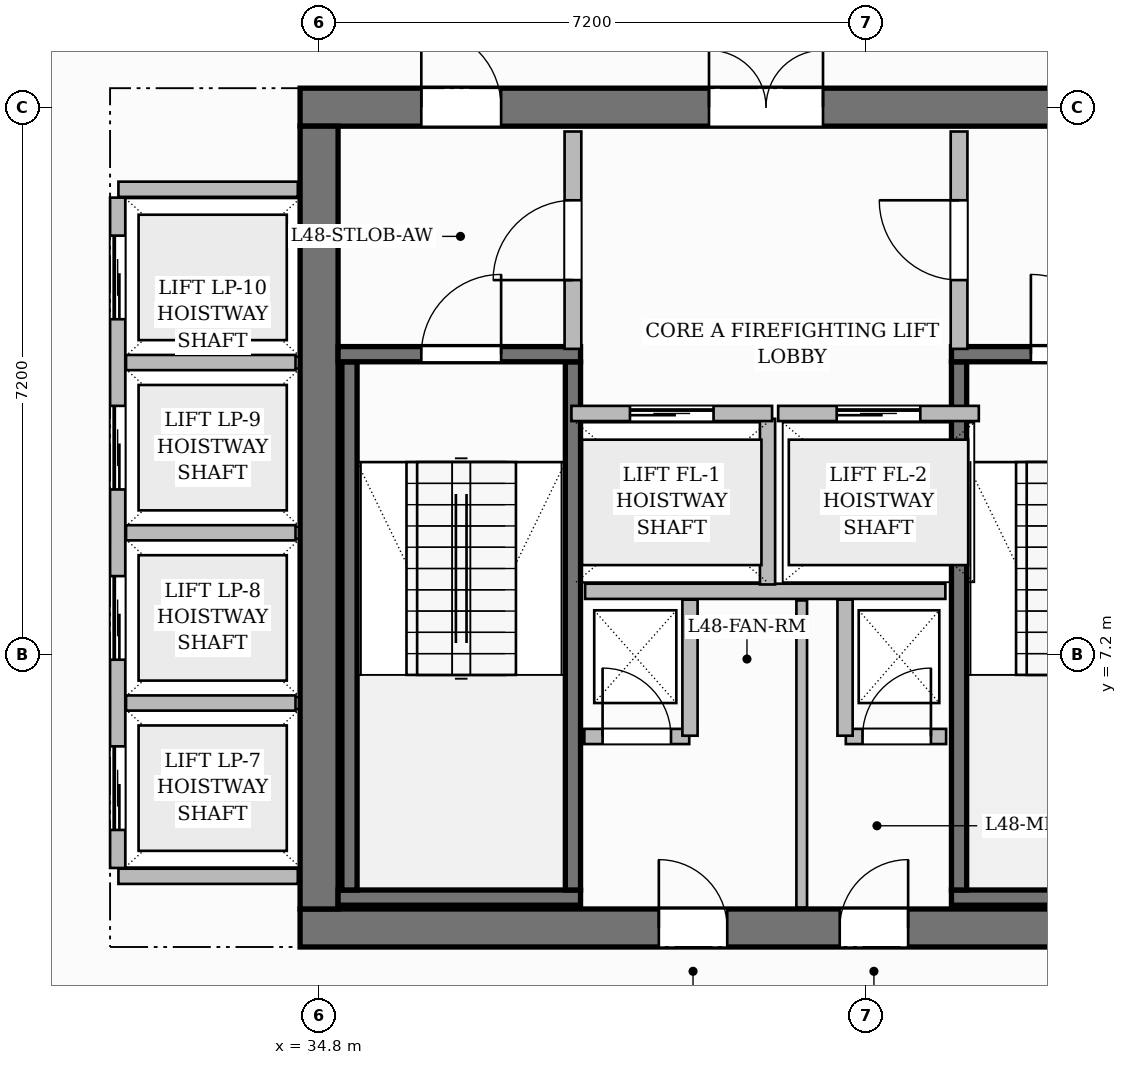
"""IFC4 building model, lengths in metres.
Left out: names, types, materials, properties, quantities, classifications, styles, units other than length and angle.
Written with IfcOpenShell. Run it as: python <this file> out.ifc"""

import sys

from ifc_helpers import new_model, si_unit, direction, frame, frame_2d, origin, place, context, subcontext, project, spatial, rectangle, extrude, source, transform, mapped, element, fill, save


model = new_model("IFC4")
c1 = context("Model", 3, precision=1e-05, world=origin(), true_north=direction((0.0, 1.0)))
c2 = subcontext(c1, "Body", "Model", "MODEL_VIEW")
j1 = project(units=[si_unit("LENGTHUNIT", "METRE"), si_unit("PLANEANGLEUNIT", "RADIAN")], contexts=[c1])
p1 = place(None, origin())
s1 = spatial("IfcSite", under=j1, at=p1, CompositionType="ELEMENT")
p2 = place(p1, origin())
s2 = spatial("IfcBuilding", under=s1, at=p2, CompositionType="ELEMENT")
p3 = place(p2, frame((0.0, 0.0, 192.65)))
s3 = spatial("IfcBuildingStorey", under=s2, at=p3, CompositionType="ELEMENT", Elevation=192.65)
p4 = place(p3, frame((34.55, 3.6, 0.0), z_axis=(0.0, 0.0, 1.0), x_axis=(1.0, 0.0, 0.0)))
e1 = element("IfcWall", 1, at=p4, inside=s3, PredefinedType="SHEAR", context=c2, shape_type="SweptSolid", body=[
    extrude(rectangle(XDim=15.5, YDim=0.5, at=frame_2d((7.75, 0.0))), origin(), (0.0, 0.0, 1.0), 3.85),
])
p5 = place(p4, frame((4.72, 0.0, 0.0)))
e2 = element("IfcOpeningElement", 2, at=p5, cuts=e1, PredefinedType="OPENING", context=c2, shape_type="SweptSolid", body=[
    extrude(rectangle(XDim=0.9, YDim=2.1, at=frame_2d((0.45, 1.05))), frame((0.0, 0.26, 0.0), z_axis=(0.0, -1.0, 0.0), x_axis=(1.0, 0.0, 0.0)), (0.0, 0.0, 1.0), 0.52),
])
p6 = place(p4, frame((7.1, 0.0, 0.0)))
e3 = element("IfcOpeningElement", 3, at=p6, cuts=e1, PredefinedType="OPENING", context=c2, shape_type="SweptSolid", body=[
    extrude(rectangle(XDim=0.9, YDim=2.1, at=frame_2d((0.45, 1.05))), frame((0.0, 0.26, 0.0), z_axis=(0.0, -1.0, 0.0), x_axis=(1.0, 0.0, 0.0)), (0.0, 0.0, 1.0), 0.52),
])
p7 = place(p3, frame((34.55, 14.4, 0.0), z_axis=(0.0, 0.0, 1.0), x_axis=(1.0, 0.0, 0.0)))
e4 = element("IfcWall", 4, at=p7, inside=s3, PredefinedType="SHEAR", context=c2, shape_type="SweptSolid", body=[
    extrude(rectangle(XDim=15.5, YDim=0.5, at=frame_2d((7.75, 0.0))), origin(), (0.0, 0.0, 1.0), 3.85),
])
p8 = place(p7, frame((5.38, 0.0, 0.0)))
e5 = element("IfcOpeningElement", 5, at=p8, cuts=e4, PredefinedType="OPENING", context=c2, shape_type="SweptSolid", body=[
    extrude(rectangle(XDim=1.5, YDim=2.2, at=frame_2d((0.75, 1.1))), frame((0.0, 0.26, 0.0), z_axis=(0.0, -1.0, 0.0), x_axis=(1.0, 0.0, 0.0)), (0.0, 0.0, 1.0), 0.52),
])
p9 = place(p7, frame((1.595, 0.0, 0.0)))
e6 = element("IfcOpeningElement", 6, at=p9, cuts=e4, PredefinedType="OPENING", context=c2, shape_type="SweptSolid", body=[
    extrude(rectangle(XDim=1.05, YDim=2.15, at=frame_2d((0.525, 1.075))), frame((0.0, 0.26, 0.0), z_axis=(0.0, -1.0, 0.0), x_axis=(1.0, 0.0, 0.0)), (0.0, 0.0, 1.0), 0.52),
])
p10 = place(p7, frame((11.225, 0.0, 0.0)))
e7 = element("IfcOpeningElement", 7, at=p10, cuts=e4, PredefinedType="OPENING", context=c2, shape_type="SweptSolid", body=[
    extrude(rectangle(XDim=1.05, YDim=2.15, at=frame_2d((0.525, 1.075))), frame((0.0, 0.26, 0.0), z_axis=(0.0, -1.0, 0.0), x_axis=(1.0, 0.0, 0.0)), (0.0, 0.0, 1.0), 0.52),
])
p11 = place(p3, frame((34.8, 3.85, 0.0), z_axis=(0.0, 0.0, 1.0), x_axis=(0.0, 1.0, 0.0)))
e8 = element("IfcWall", 8, at=p11, inside=s3, PredefinedType="SHEAR", context=c2, shape_type="SweptSolid", body=[
    extrude(rectangle(XDim=10.3, YDim=0.5, at=frame_2d((5.15, 0.0))), origin(), (0.0, 0.0, 1.0), 3.85),
])
p12 = place(p3, frame((35.05, 4.0, 0.0), z_axis=(0.0, 0.0, 1.0), x_axis=(1.0, 0.0, 0.0)))
e9 = element("IfcWall", 9, at=p12, inside=s3, PredefinedType="SHEAR", context=c2, shape_type="SweptSolid", body=[
    extrude(rectangle(XDim=3.19, YDim=0.2, at=frame_2d((1.595, 0.0))), origin(), (0.0, 0.0, 1.0), 3.85),
])
for number, where, z_axis, x_axis in (
    (10, (35.2, 4.1, 0.0), (0.0, 0.0, 1.0), (0.0, 1.0, 0.0)),
    (11, (38.14, 4.1, 0.0), (0.0, 0.0, 1.0), (0.0, 1.0, 0.0)),
):
    element("IfcWall", number, at=place(p3, frame(where, z_axis=z_axis, x_axis=x_axis)), inside=s3, PredefinedType="SHEAR", context=c2, shape_type="SweptSolid", body=[
        extrude(rectangle(XDim=6.95, YDim=0.2, at=frame_2d((3.475, 0.0))), origin(), (0.0, 0.0, 1.0), 3.85),
    ])
p13 = place(p3, frame((35.05, 11.15, 0.0), z_axis=(0.0, 0.0, 1.0), x_axis=(1.0, 0.0, 0.0)))
e12 = element("IfcWall", 12, at=p13, inside=s3, PredefinedType="SHEAR", context=c2, shape_type="SweptSolid", body=[
    extrude(rectangle(XDim=3.19, YDim=0.2, at=frame_2d((1.595, 0.0))), origin(), (0.0, 0.0, 1.0), 3.85),
])
p14 = place(p13, frame((1.095, 0.0, 0.0)))
e13 = element("IfcOpeningElement", 13, at=p14, cuts=e12, PredefinedType="OPENING", context=c2, shape_type="SweptSolid", body=[
    extrude(rectangle(XDim=1.05, YDim=2.2, at=frame_2d((0.525, 1.1))), frame((0.0, 0.11, 0.0), z_axis=(0.0, -1.0, 0.0), x_axis=(1.0, 0.0, 0.0)), (0.0, 0.0, 1.0), 0.22),
])
p15 = place(p3, frame((43.12, 4.0, 0.0), z_axis=(0.0, 0.0, 1.0), x_axis=(1.0, 0.0, 0.0)))
e14 = element("IfcWall", 14, at=p15, inside=s3, PredefinedType="SHEAR", context=c2, shape_type="SweptSolid", body=[
    extrude(rectangle(XDim=6.43, YDim=0.2, at=frame_2d((3.215, 0.0))), origin(), (0.0, 0.0, 1.0), 3.85),
])
p16 = place(p3, frame((43.22, 4.1, 0.0), z_axis=(0.0, 0.0, 1.0), x_axis=(0.0, 1.0, 0.0)))
e15 = element("IfcWall", 15, at=p16, inside=s3, PredefinedType="SHEAR", context=c2, shape_type="SweptSolid", body=[
    extrude(rectangle(XDim=6.95, YDim=0.2, at=frame_2d((3.475, 0.0))), origin(), (0.0, 0.0, 1.0), 3.85),
])
p17 = place(p3, frame((43.12, 11.15, 0.0), z_axis=(0.0, 0.0, 1.0), x_axis=(1.0, 0.0, 0.0)))
e16 = element("IfcWall", 16, at=p17, inside=s3, PredefinedType="SHEAR", context=c2, shape_type="SweptSolid", body=[
    extrude(rectangle(XDim=6.43, YDim=0.2, at=frame_2d((3.215, 0.0))), origin(), (0.0, 0.0, 1.0), 3.85),
])
p18 = place(p17, frame((1.045, 0.0, 0.0)))
e17 = element("IfcOpeningElement", 17, at=p18, cuts=e16, PredefinedType="OPENING", context=c2, shape_type="SweptSolid", body=[
    extrude(rectangle(XDim=1.05, YDim=2.2, at=frame_2d((0.525, 1.1))), frame((0.0, 0.11, 0.0), z_axis=(0.0, -1.0, 0.0), x_axis=(1.0, 0.0, 0.0)), (0.0, 0.0, 1.0), 0.22),
])
p19 = place(p17, frame((4.125, 0.0, 0.0)))
e18 = element("IfcOpeningElement", 18, at=p19, cuts=e16, PredefinedType="OPENING", context=c2, shape_type="SweptSolid", body=[
    extrude(rectangle(XDim=1.05, YDim=2.2, at=frame_2d((0.525, 1.1))), frame((0.0, 0.11, 0.0), z_axis=(0.0, -1.0, 0.0), x_axis=(1.0, 0.0, 0.0)), (0.0, 0.0, 1.0), 0.22),
])
p20 = place(p3, frame((38.3, 8.03, 0.0), z_axis=(0.0, 0.0, 1.0), x_axis=(1.0, 0.0, 0.0)))
e19 = element("IfcWall", 19, at=p20, inside=s3, PredefinedType="PARTITIONING", context=c2, shape_type="SweptSolid", body=[
    extrude(rectangle(XDim=4.74, YDim=0.2, at=frame_2d((2.37, 0.0))), origin(), (0.0, 0.0, 1.0), 3.55),
])
p21 = place(p3, frame((40.7, 8.12, 0.0), z_axis=(0.0, 0.0, 1.0), x_axis=(0.0, 1.0, 0.0)))
e20 = element("IfcWall", 20, at=p21, inside=s3, PredefinedType="PARTITIONING", context=c2, shape_type="SweptSolid", body=[
    extrude(rectangle(XDim=2.18, YDim=0.2, at=frame_2d((1.09, 0.0))), origin(), (0.0, 0.0, 1.0), 3.55),
])
p22 = place(p3, frame((38.14, 11.22, 0.0), z_axis=(0.0, 0.0, 1.0), x_axis=(0.0, 1.0, 0.0)))
e21 = element("IfcWall", 21, at=p22, inside=s3, PredefinedType="PARTITIONING", context=c2, shape_type="SweptSolid", body=[
    extrude(rectangle(XDim=2.86, YDim=0.22, at=frame_2d((1.43, 0.0))), origin(), (0.0, 0.0, 1.0), 3.55),
])
p23 = place(p22, frame((0.905, 0.0, 0.0)))
e22 = element("IfcOpeningElement", 22, at=p23, cuts=e21, PredefinedType="OPENING", context=c2, shape_type="SweptSolid", body=[
    extrude(rectangle(XDim=1.05, YDim=2.15, at=frame_2d((0.525, 1.075))), frame((0.0, 0.12, 0.0), z_axis=(0.0, -1.0, 0.0), x_axis=(1.0, 0.0, 0.0)), (0.0, 0.0, 1.0), 0.24),
])
p24 = place(p3, frame((43.22, 11.22, 0.0), z_axis=(0.0, 0.0, 1.0), x_axis=(0.0, 1.0, 0.0)))
e23 = element("IfcWall", 23, at=p24, inside=s3, PredefinedType="PARTITIONING", context=c2, shape_type="SweptSolid", body=[
    extrude(rectangle(XDim=2.86, YDim=0.22, at=frame_2d((1.43, 0.0))), origin(), (0.0, 0.0, 1.0), 3.55),
])
p25 = place(p24, frame((0.905, 0.0, 0.0)))
e24 = element("IfcOpeningElement", 24, at=p25, cuts=e23, PredefinedType="OPENING", context=c2, shape_type="SweptSolid", body=[
    extrude(rectangle(XDim=1.05, YDim=2.15, at=frame_2d((0.525, 1.075))), frame((0.0, 0.12, 0.0), z_axis=(0.0, -1.0, 0.0), x_axis=(1.0, 0.0, 0.0)), (0.0, 0.0, 1.0), 0.24),
])
p26 = place(p3, frame((38.29, 6.12, 0.0), z_axis=(0.0, 0.0, 1.0), x_axis=(1.0, 0.0, 0.0)))
e25 = element("IfcWall", 25, at=p26, inside=s3, PredefinedType="PARTITIONING", context=c2, shape_type="SweptSolid", body=[
    extrude(rectangle(XDim=1.38, YDim=0.2, at=frame_2d((0.69, 0.0))), origin(), (0.0, 0.0, 1.0), 3.55),
])
p27 = place(p26, frame((0.24, 0.0, 0.0)))
e26 = element("IfcOpeningElement", 26, at=p27, cuts=e25, PredefinedType="OPENING", context=c2, shape_type="SweptSolid", body=[
    extrude(rectangle(XDim=0.9, YDim=2.1, at=frame_2d((0.45, 1.05))), frame((0.0, 0.11, 0.0), z_axis=(0.0, -1.0, 0.0), x_axis=(1.0, 0.0, 0.0)), (0.0, 0.0, 1.0), 0.22),
])
p28 = place(p3, frame((39.68, 6.13, 0.0), z_axis=(0.0, 0.0, 1.0), x_axis=(0.0, 1.0, 0.0)))
e27 = element("IfcWall", 27, at=p28, inside=s3, PredefinedType="PARTITIONING", context=c2, shape_type="SweptSolid", body=[
    extrude(rectangle(XDim=1.79, YDim=0.2, at=frame_2d((0.895, 0.0))), origin(), (0.0, 0.0, 1.0), 3.55),
])
p29 = place(p3, frame((41.73, 6.12, 0.0), z_axis=(0.0, 0.0, 1.0), x_axis=(1.0, 0.0, 0.0)))
e28 = element("IfcWall", 28, at=p29, inside=s3, PredefinedType="PARTITIONING", context=c2, shape_type="SweptSolid", body=[
    extrude(rectangle(XDim=1.32, YDim=0.2, at=frame_2d((0.66, 0.0))), origin(), (0.0, 0.0, 1.0), 3.55),
])
p30 = place(p29, frame((0.22, 0.0, 0.0)))
e29 = element("IfcOpeningElement", 29, at=p30, cuts=e28, PredefinedType="OPENING", context=c2, shape_type="SweptSolid", body=[
    extrude(rectangle(XDim=0.9, YDim=2.1, at=frame_2d((0.45, 1.05))), frame((0.0, 0.11, 0.0), z_axis=(0.0, -1.0, 0.0), x_axis=(1.0, 0.0, 0.0)), (0.0, 0.0, 1.0), 0.22),
])
p31 = place(p3, frame((41.72, 6.13, 0.0), z_axis=(0.0, 0.0, 1.0), x_axis=(0.0, 1.0, 0.0)))
e30 = element("IfcWall", 30, at=p31, inside=s3, PredefinedType="PARTITIONING", context=c2, shape_type="SweptSolid", body=[
    extrude(rectangle(XDim=1.79, YDim=0.2, at=frame_2d((0.895, 0.0))), origin(), (0.0, 0.0, 1.0), 3.55),
])
p32 = place(p3, frame((41.15, 3.87, 0.0), z_axis=(0.0, 0.0, 1.0), x_axis=(0.0, 1.0, 0.0)))
e31 = element("IfcWall", 31, at=p32, inside=s3, PredefinedType="PARTITIONING", context=c2, shape_type="SweptSolid", body=[
    extrude(rectangle(XDim=4.04, YDim=0.14, at=frame_2d((2.02, 0.0))), origin(), (0.0, 0.0, 1.0), 3.55),
])
for number, where, z_axis, x_axis in (
    (32, (32.16, 4.28, 0.0), (0.0, 0.0, 1.0), (1.0, 0.0, 0.0)),
    (33, (32.16, 13.32, 0.0), (0.0, 0.0, 1.0), (1.0, 0.0, 0.0)),
):
    element("IfcWall", number, at=place(p3, frame(where, z_axis=z_axis, x_axis=x_axis)), inside=s3, PredefinedType="PARTITIONING", context=c2, shape_type="SweptSolid", body=[
        extrude(rectangle(XDim=2.36, YDim=0.2, at=frame_2d((1.18, 0.0))), origin(), (0.0, 0.0, 1.0), 3.55),
    ])
p33 = place(p3, frame((32.15, 4.39, 0.0), z_axis=(0.0, 0.0, 1.0), x_axis=(0.0, 1.0, 0.0)))
e34 = element("IfcWall", 34, at=p33, inside=s3, PredefinedType="PARTITIONING", context=c2, shape_type="SweptSolid", body=[
    extrude(rectangle(XDim=8.82, YDim=0.2, at=frame_2d((4.41, 0.0))), origin(), (0.0, 0.0, 1.0), 3.55),
])
p34 = place(p33, frame((0.5, 0.0, 0.0)))
e35 = element("IfcOpeningElement", 35, at=p34, cuts=e34, PredefinedType="OPENING", context=c2, shape_type="SweptSolid", body=[
    extrude(rectangle(XDim=1.1, YDim=2.2, at=frame_2d((0.55, 1.1))), frame((0.0, 0.11, 0.0), z_axis=(0.0, -1.0, 0.0), x_axis=(1.0, 0.0, 0.0)), (0.0, 0.0, 1.0), 0.22),
])
p35 = place(p33, frame((2.74, 0.0, 0.0)))
e36 = element("IfcOpeningElement", 36, at=p35, cuts=e34, PredefinedType="OPENING", context=c2, shape_type="SweptSolid", body=[
    extrude(rectangle(XDim=1.1, YDim=2.2, at=frame_2d((0.55, 1.1))), frame((0.0, 0.11, 0.0), z_axis=(0.0, -1.0, 0.0), x_axis=(1.0, 0.0, 0.0)), (0.0, 0.0, 1.0), 0.22),
])
p36 = place(p33, frame((4.98, 0.0, 0.0)))
e37 = element("IfcOpeningElement", 37, at=p36, cuts=e34, PredefinedType="OPENING", context=c2, shape_type="SweptSolid", body=[
    extrude(rectangle(XDim=1.1, YDim=2.2, at=frame_2d((0.55, 1.1))), frame((0.0, 0.11, 0.0), z_axis=(0.0, -1.0, 0.0), x_axis=(1.0, 0.0, 0.0)), (0.0, 0.0, 1.0), 0.22),
])
p37 = place(p33, frame((7.22, 0.0, 0.0)))
e38 = element("IfcOpeningElement", 38, at=p37, cuts=e34, PredefinedType="OPENING", context=c2, shape_type="SweptSolid", body=[
    extrude(rectangle(XDim=1.1, YDim=2.2, at=frame_2d((0.55, 1.1))), frame((0.0, 0.11, 0.0), z_axis=(0.0, -1.0, 0.0), x_axis=(1.0, 0.0, 0.0)), (0.0, 0.0, 1.0), 0.22),
])
for number, where, z_axis, x_axis in (
    (39, (32.26, 6.56, 0.0), (0.0, 0.0, 1.0), (1.0, 0.0, 0.0)),
    (40, (32.26, 8.8, 0.0), (0.0, 0.0, 1.0), (1.0, 0.0, 0.0)),
    (41, (32.26, 11.04, 0.0), (0.0, 0.0, 1.0), (1.0, 0.0, 0.0)),
):
    element("IfcWall", number, at=place(p3, frame(where, z_axis=z_axis, x_axis=x_axis)), inside=s3, PredefinedType="PARTITIONING", context=c2, shape_type="SweptSolid", body=[
        extrude(rectangle(XDim=2.23, YDim=0.2, at=frame_2d((1.115, 0.0))), origin(), (0.0, 0.0, 1.0), 3.55),
    ])
p38 = place(p3, frame((38.12, 10.37, 0.0), z_axis=(0.0, 0.0, 1.0), x_axis=(1.0, 0.0, 0.0)))
e42 = element("IfcWall", 42, at=p38, inside=s3, PredefinedType="PARTITIONING", context=c2, shape_type="SweptSolid", body=[
    extrude(rectangle(XDim=2.64, YDim=0.2, at=frame_2d((1.32, 0.0))), origin(), (0.0, 0.0, 1.0), 3.55),
])
p39 = place(p38, frame((0.77, 0.0, 0.0)))
e43 = element("IfcOpeningElement", 43, at=p39, cuts=e42, PredefinedType="OPENING", context=c2, shape_type="SweptSolid", body=[
    extrude(rectangle(XDim=1.1, YDim=2.2, at=frame_2d((0.55, 1.1))), frame((0.0, 0.11, 0.0), z_axis=(0.0, -1.0, 0.0), x_axis=(1.0, 0.0, 0.0)), (0.0, 0.0, 1.0), 0.22),
])
p40 = place(p3, frame((40.84, 10.37, 0.0), z_axis=(0.0, 0.0, 1.0), x_axis=(1.0, 0.0, 0.0)))
e44 = element("IfcWall", 44, at=p40, inside=s3, PredefinedType="PARTITIONING", context=c2, shape_type="SweptSolid", body=[
    extrude(rectangle(XDim=2.64, YDim=0.2, at=frame_2d((1.32, 0.0))), origin(), (0.0, 0.0, 1.0), 3.55),
])
p41 = place(p40, frame((0.77, 0.0, 0.0)))
e45 = element("IfcOpeningElement", 45, at=p41, cuts=e44, PredefinedType="OPENING", context=c2, shape_type="SweptSolid", body=[
    extrude(rectangle(XDim=1.1, YDim=2.2, at=frame_2d((0.55, 1.1))), frame((0.0, 0.11, 0.0), z_axis=(0.0, -1.0, 0.0), x_axis=(1.0, 0.0, 0.0)), (0.0, 0.0, 1.0), 0.22),
])
m1 = source(origin(), c2, "Body", "SweptSolid", [
    extrude(rectangle(XDim=1.05, YDim=2.2, at=frame_2d((0.525, 1.1))), frame((0.0, 0.025, 0.0), z_axis=(0.0, -1.0, 0.0), x_axis=(1.0, 0.0, 0.0)), (0.0, 0.0, 1.0), 0.05),
])
p42 = place(p14, origin())
e46 = element("IfcDoor", 46, at=p42, inside=s3, OperationType="SINGLE_SWING_RIGHT", PredefinedType="DOOR", context=c2, shape_type="MappedRepresentation", body=[
    mapped(m1, transform((0.0, 0.0, 0.0), scale=1.0)),
])
fill(e13, e46)
p43 = place(p18, origin())
e47 = element("IfcDoor", 47, at=p43, inside=s3, OperationType="SINGLE_SWING_LEFT", PredefinedType="DOOR", context=c2, shape_type="MappedRepresentation", body=[
    mapped(m1, transform((0.0, 0.0, 0.0), scale=1.0)),
])
fill(e17, e47)
m2 = source(origin(), c2, "Body", "SweptSolid", [
    extrude(rectangle(XDim=1.05, YDim=2.15, at=frame_2d((0.525, 1.075))), frame((0.0, 0.025, 0.0), z_axis=(0.0, -1.0, 0.0), x_axis=(1.0, 0.0, 0.0)), (0.0, 0.0, 1.0), 0.05),
])
p44 = place(p23, origin())
e48 = element("IfcDoor", 48, at=p44, inside=s3, OperationType="SINGLE_SWING_LEFT", PredefinedType="DOOR", context=c2, shape_type="MappedRepresentation", body=[
    mapped(m2, transform((0.0, 0.0, 0.0), scale=1.0)),
])
fill(e22, e48)
p45 = place(p25, origin())
e49 = element("IfcDoor", 49, at=p45, inside=s3, OperationType="SINGLE_SWING_RIGHT", PredefinedType="DOOR", context=c2, shape_type="MappedRepresentation", body=[
    mapped(m2, transform((0.0, 0.0, 0.0), scale=1.0)),
])
fill(e24, e49)
m3 = source(origin(), c2, "Body", "SweptSolid", [
    extrude(rectangle(XDim=1.5, YDim=2.2, at=frame_2d((0.75, 1.1))), frame((0.0, 0.025, 0.0), z_axis=(0.0, -1.0, 0.0), x_axis=(1.0, 0.0, 0.0)), (0.0, 0.0, 1.0), 0.05),
])
p46 = place(p8, origin())
e50 = element("IfcDoor", 50, at=p46, inside=s3, OperationType="DOUBLE_DOOR_SINGLE_SWING", PredefinedType="DOOR", context=c2, shape_type="MappedRepresentation", body=[
    mapped(m3, transform((0.0, 0.0, 0.0), scale=1.0)),
])
fill(e5, e50)
p47 = place(p9, origin())
e51 = element("IfcDoor", 51, at=p47, inside=s3, OperationType="SINGLE_SWING_LEFT", PredefinedType="DOOR", context=c2, shape_type="MappedRepresentation", body=[
    mapped(m2, transform((0.0, 0.0, 0.0), scale=1.0)),
])
fill(e6, e51)
m4 = source(origin(), c2, "Body", "SweptSolid", [
    extrude(rectangle(XDim=0.9, YDim=2.1, at=frame_2d((0.45, 1.05))), frame((0.0, 0.025, 0.0), z_axis=(0.0, -1.0, 0.0), x_axis=(1.0, 0.0, 0.0)), (0.0, 0.0, 1.0), 0.05),
])
p48 = place(p27, origin())
e52 = element("IfcDoor", 52, at=p48, inside=s3, OperationType="SINGLE_SWING_LEFT", PredefinedType="DOOR", context=c2, shape_type="MappedRepresentation", body=[
    mapped(m4, transform((0.0, 0.0, 0.0), scale=1.0)),
])
fill(e26, e52)
p49 = place(p30, origin())
e53 = element("IfcDoor", 53, at=p49, inside=s3, OperationType="SINGLE_SWING_RIGHT", PredefinedType="DOOR", context=c2, shape_type="MappedRepresentation", body=[
    mapped(m4, transform((0.0, 0.0, 0.0), scale=1.0)),
])
fill(e29, e53)
p50 = place(p5, origin())
e54 = element("IfcDoor", 54, at=p50, inside=s3, OperationType="SINGLE_SWING_LEFT", PredefinedType="DOOR", context=c2, shape_type="MappedRepresentation", body=[
    mapped(m4, transform((0.0, 0.0, 0.0), scale=1.0)),
])
fill(e2, e54)
p51 = place(p6, origin())
e55 = element("IfcDoor", 55, at=p51, inside=s3, OperationType="SINGLE_SWING_RIGHT", PredefinedType="DOOR", context=c2, shape_type="MappedRepresentation", body=[
    mapped(m4, transform((0.0, 0.0, 0.0), scale=1.0)),
])
fill(e3, e55)
m5 = source(origin(), c2, "Body", "SweptSolid", [
    extrude(rectangle(XDim=1.1, YDim=2.2, at=frame_2d((0.55, 1.1))), frame((0.0, 0.025, 0.0), z_axis=(0.0, -1.0, 0.0), x_axis=(1.0, 0.0, 0.0)), (0.0, 0.0, 1.0), 0.05),
])
p52 = place(p39, origin())
e56 = element("IfcDoor", 56, at=p52, inside=s3, OperationType="SLIDING_TO_LEFT", PredefinedType="DOOR", context=c2, shape_type="MappedRepresentation", body=[
    mapped(m5, transform((0.0, 0.0, 0.0), scale=1.0)),
])
fill(e43, e56)
p53 = place(p41, origin())
e57 = element("IfcDoor", 57, at=p53, inside=s3, OperationType="SLIDING_TO_LEFT", PredefinedType="DOOR", context=c2, shape_type="MappedRepresentation", body=[
    mapped(m5, transform((0.0, 0.0, 0.0), scale=1.0)),
])
fill(e45, e57)
p54 = place(p34, origin())
e58 = element("IfcDoor", 58, at=p54, inside=s3, OperationType="SLIDING_TO_LEFT", PredefinedType="DOOR", context=c2, shape_type="MappedRepresentation", body=[
    mapped(m5, transform((0.0, 0.0, 0.0), scale=1.0)),
])
fill(e35, e58)
p55 = place(p35, origin())
e59 = element("IfcDoor", 59, at=p55, inside=s3, OperationType="SLIDING_TO_LEFT", PredefinedType="DOOR", context=c2, shape_type="MappedRepresentation", body=[
    mapped(m5, transform((0.0, 0.0, 0.0), scale=1.0)),
])
fill(e36, e59)
p56 = place(p36, origin())
e60 = element("IfcDoor", 60, at=p56, inside=s3, OperationType="SLIDING_TO_LEFT", PredefinedType="DOOR", context=c2, shape_type="MappedRepresentation", body=[
    mapped(m5, transform((0.0, 0.0, 0.0), scale=1.0)),
])
fill(e37, e60)
p57 = place(p37, origin())
e61 = element("IfcDoor", 61, at=p57, inside=s3, OperationType="SLIDING_TO_LEFT", PredefinedType="DOOR", context=c2, shape_type="MappedRepresentation", body=[
    mapped(m5, transform((0.0, 0.0, 0.0), scale=1.0)),
])
fill(e38, e61)
save(model, sys.argv[1])
